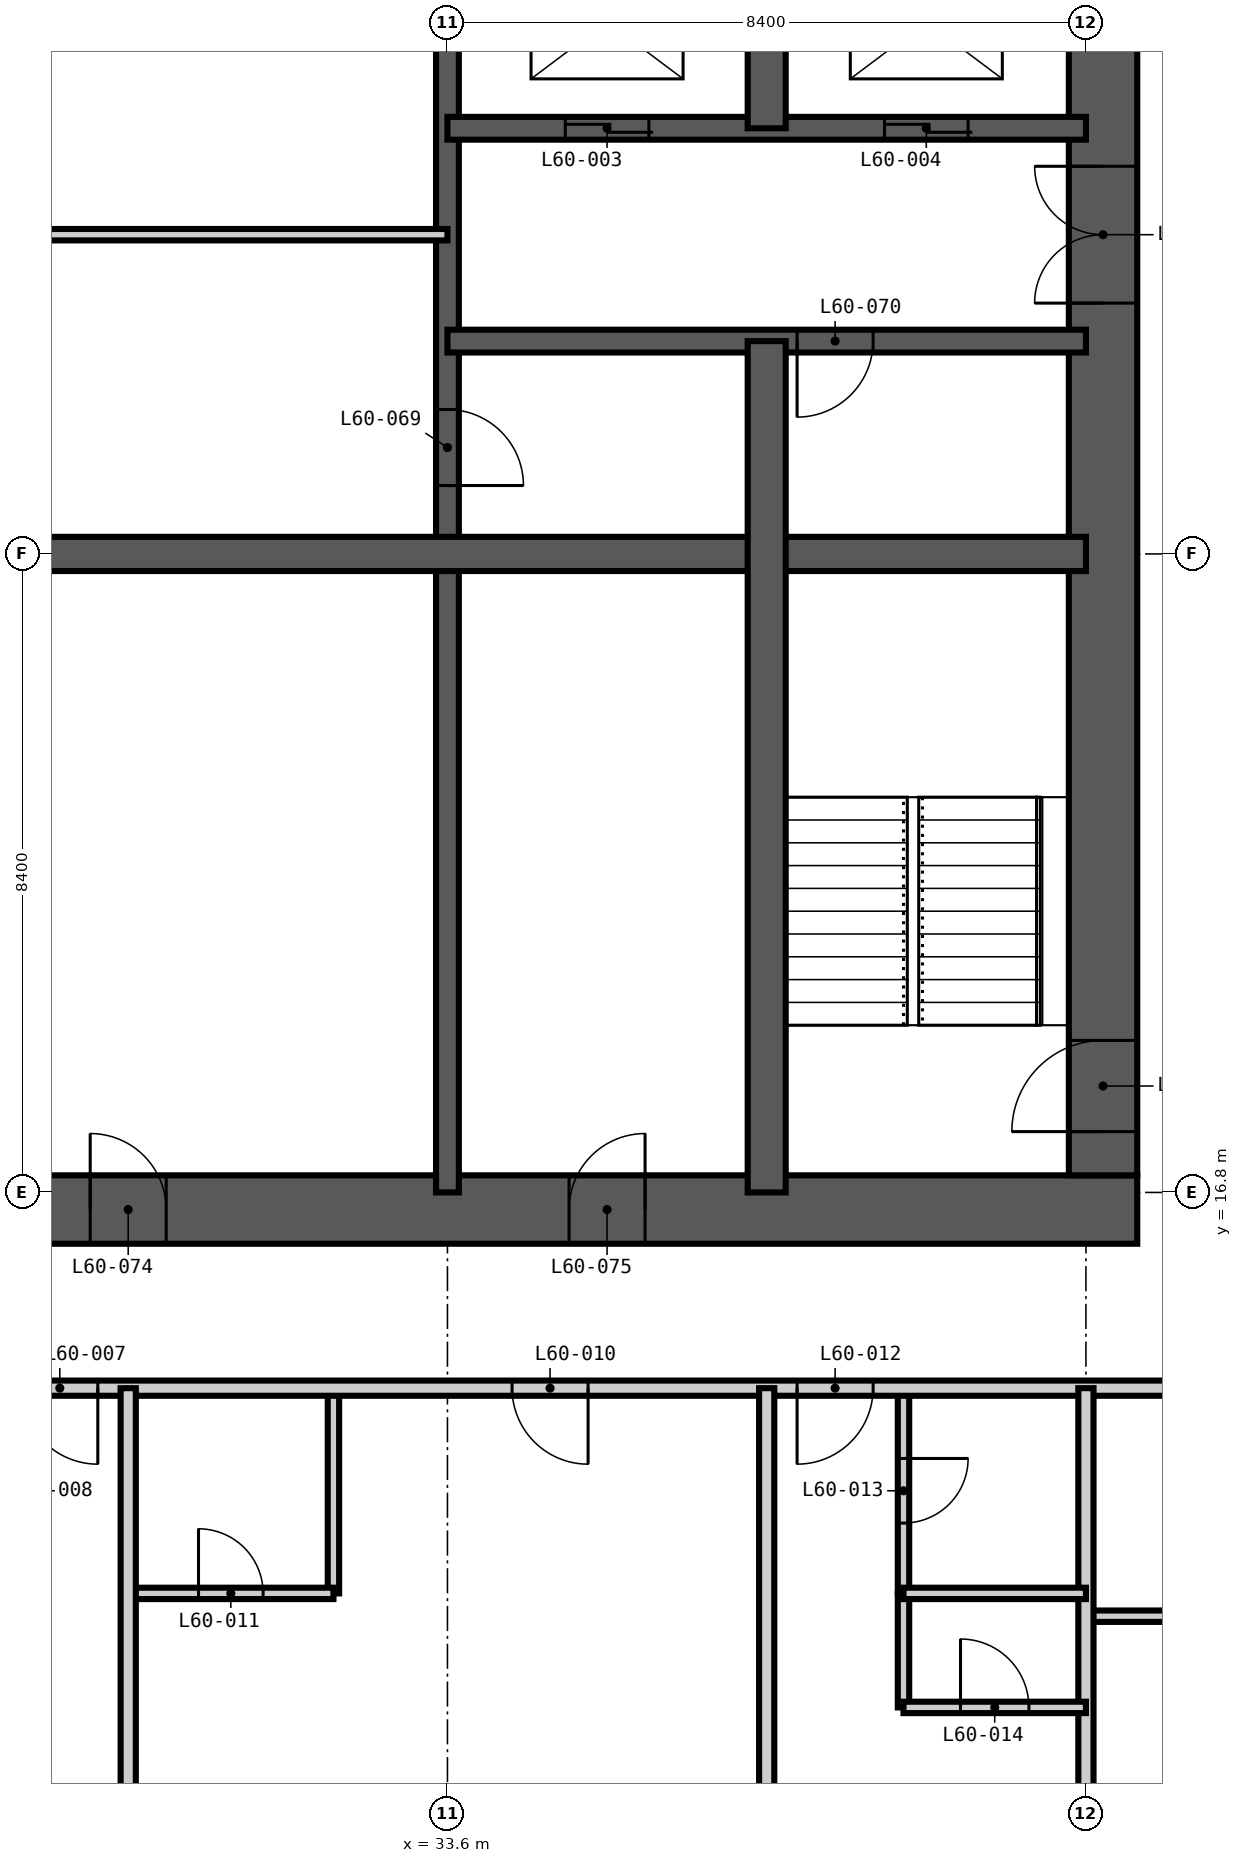
"""IFC4 building model, lengths in metres.
Left out: names, types, materials, properties, quantities, classifications, styles, units other than length and angle.
Written with IfcOpenShell. Run it as: python <this file> out.ifc"""

import sys

from ifc_helpers import new_model, si_unit, direction, frame, frame_2d, origin, place, context, subcontext, project, spatial, rectangle, extrude, element, fill, save


model = new_model("IFC4")
c1 = context("Model", 3, precision=1e-05, world=origin(), true_north=direction((0.0, 1.0)))
c2 = subcontext(c1, "Body", "Model", "MODEL_VIEW")
j1 = project(units=[si_unit("LENGTHUNIT", "METRE"), si_unit("PLANEANGLEUNIT", "RADIAN")], contexts=[c1])
p1 = place(None, origin())
s1 = spatial("IfcSite", under=j1, at=p1, CompositionType="ELEMENT")
p2 = place(p1, origin())
s2 = spatial("IfcBuilding", under=s1, at=p2, CompositionType="ELEMENT")
p3 = place(p2, frame((0.0, 0.0, 233.4)))
s3 = spatial("IfcBuildingStorey", under=s2, at=p3, CompositionType="ELEMENT", Elevation=233.4)
p4 = place(p3, frame((24.525, 16.575, -0.35), z_axis=(0.0, 0.0, 1.0), x_axis=(1.0, 0.0, 0.0)))
e1 = element("IfcWall", 1, at=p4, inside=s3, PredefinedType="SHEAR", context=c2, shape_type="SweptSolid", body=[
    extrude(rectangle(XDim=18.15, YDim=0.9, at=frame_2d((9.075, 0.0))), origin(), (0.0, 0.0, 1.0), 3.9),
])
p5 = place(p4, frame((4.375, 0.0, 0.35)))
e2 = element("IfcOpeningElement", 2, at=p5, cuts=e1, PredefinedType="OPENING", context=c2, shape_type="SweptSolid", body=[
    extrude(rectangle(XDim=1.0, YDim=2.1, at=frame_2d((0.5, 1.05))), frame((0.0, 0.46, 0.0), z_axis=(0.0, -1.0, 0.0), x_axis=(1.0, 0.0, 0.0)), (0.0, 0.0, 1.0), 0.92),
])
p6 = place(p4, frame((10.675, 0.0, 0.35)))
e3 = element("IfcOpeningElement", 3, at=p6, cuts=e1, PredefinedType="OPENING", context=c2, shape_type="SweptSolid", body=[
    extrude(rectangle(XDim=1.0, YDim=2.1, at=frame_2d((0.5, 1.05))), frame((0.0, 0.46, 0.0), z_axis=(0.0, -1.0, 0.0), x_axis=(1.0, 0.0, 0.0)), (0.0, 0.0, 1.0), 0.92),
])
p7 = place(p3, frame((42.225, 17.025, -0.35), z_axis=(0.0, 0.0, 1.0), x_axis=(0.0, 1.0, 0.0)))
e4 = element("IfcWall", 4, at=p7, inside=s3, PredefinedType="SHEAR", context=c2, shape_type="SweptSolid", body=[
    extrude(rectangle(XDim=24.75, YDim=0.9, at=frame_2d((12.375, 0.0))), origin(), (0.0, 0.0, 1.0), 3.9),
])
p8 = place(p7, frame((0.575, 0.0, 0.35)))
e5 = element("IfcOpeningElement", 5, at=p8, cuts=e4, PredefinedType="OPENING", context=c2, shape_type="SweptSolid", body=[
    extrude(rectangle(XDim=1.2, YDim=2.2, at=frame_2d((0.6, 1.1))), frame((0.0, 0.46, 0.0), z_axis=(0.0, -1.0, 0.0), x_axis=(1.0, 0.0, 0.0)), (0.0, 0.0, 1.0), 0.92),
])
p9 = place(p7, frame((11.475, 0.0, 0.35)))
e6 = element("IfcOpeningElement", 6, at=p9, cuts=e4, PredefinedType="OPENING", context=c2, shape_type="SweptSolid", body=[
    extrude(rectangle(XDim=1.8, YDim=2.2, at=frame_2d((0.9, 1.1))), frame((0.0, 0.46, 0.0), z_axis=(0.0, -1.0, 0.0), x_axis=(1.0, 0.0, 0.0)), (0.0, 0.0, 1.0), 0.92),
])
p10 = place(p7, frame((20.275, 0.0, 0.35)))
e7 = element("IfcOpeningElement", 7, at=p10, cuts=e4, PredefinedType="OPENING", context=c2, shape_type="SweptSolid", body=[
    extrude(rectangle(XDim=1.0, YDim=2.1, at=frame_2d((0.5, 1.05))), frame((0.0, 0.46, 0.0), z_axis=(0.0, -1.0, 0.0), x_axis=(1.0, 0.0, 0.0)), (0.0, 0.0, 1.0), 0.92),
])
p11 = place(p3, frame((33.6, 16.8, -0.35), z_axis=(0.0, 0.0, 1.0), x_axis=(0.0, 1.0, 0.0)))
e8 = element("IfcWall", 8, at=p11, inside=s3, PredefinedType="SHEAR", context=c2, shape_type="SweptSolid", body=[
    extrude(rectangle(XDim=25.2, YDim=0.3, at=frame_2d((12.6, 0.0))), origin(), (0.0, 0.0, 1.0), 3.9),
])
p12 = place(p11, frame((22.5, 0.0, 0.35)))
e9 = element("IfcOpeningElement", 9, at=p12, cuts=e8, PredefinedType="OPENING", context=c2, shape_type="SweptSolid", body=[
    extrude(rectangle(XDim=1.2, YDim=2.2, at=frame_2d((0.6, 1.1))), frame((0.0, 0.16, 0.0), z_axis=(0.0, -1.0, 0.0), x_axis=(1.0, 0.0, 0.0)), (0.0, 0.0, 1.0), 0.32),
])
p13 = place(p11, frame((18.3, 0.0, 0.35)))
e10 = element("IfcOpeningElement", 10, at=p13, cuts=e8, PredefinedType="OPENING", context=c2, shape_type="SweptSolid", body=[
    extrude(rectangle(XDim=1.2, YDim=2.2, at=frame_2d((0.6, 1.1))), frame((0.0, 0.16, 0.0), z_axis=(0.0, -1.0, 0.0), x_axis=(1.0, 0.0, 0.0)), (0.0, 0.0, 1.0), 0.32),
])
p14 = place(p11, frame((9.3, 0.0, 0.35)))
e11 = element("IfcOpeningElement", 11, at=p14, cuts=e8, PredefinedType="OPENING", context=c2, shape_type="SweptSolid", body=[
    extrude(rectangle(XDim=1.0, YDim=2.1, at=frame_2d((0.5, 1.05))), frame((0.0, 0.16, 0.0), z_axis=(0.0, -1.0, 0.0), x_axis=(1.0, 0.0, 0.0)), (0.0, 0.0, 1.0), 0.32),
])
p15 = place(p3, frame((33.6, 28.0, -0.35), z_axis=(0.0, 0.0, 1.0), x_axis=(1.0, 0.0, 0.0)))
e12 = element("IfcWall", 12, at=p15, inside=s3, PredefinedType="SHEAR", context=c2, shape_type="SweptSolid", body=[
    extrude(rectangle(XDim=8.4, YDim=0.3, at=frame_2d((4.2, 0.0))), origin(), (0.0, 0.0, 1.0), 3.9),
])
p16 = place(p15, frame((4.6, 0.0, 0.35)))
e13 = element("IfcOpeningElement", 13, at=p16, cuts=e12, PredefinedType="OPENING", context=c2, shape_type="SweptSolid", body=[
    extrude(rectangle(XDim=1.0, YDim=2.1, at=frame_2d((0.5, 1.05))), frame((0.0, 0.16, 0.0), z_axis=(0.0, -1.0, 0.0), x_axis=(1.0, 0.0, 0.0)), (0.0, 0.0, 1.0), 0.32),
])
p17 = place(p3, frame((33.6, 30.8, -0.35), z_axis=(0.0, 0.0, 1.0), x_axis=(1.0, 0.0, 0.0)))
e14 = element("IfcWall", 14, at=p17, inside=s3, PredefinedType="SHEAR", context=c2, shape_type="SweptSolid", body=[
    extrude(rectangle(XDim=8.4, YDim=0.3, at=frame_2d((4.2, 0.0))), origin(), (0.0, 0.0, 1.0), 3.9),
])
p18 = place(p17, frame((1.55, 0.0, 0.35)))
e15 = element("IfcOpeningElement", 15, at=p18, cuts=e14, PredefinedType="OPENING", context=c2, shape_type="SweptSolid", body=[
    extrude(rectangle(XDim=1.1, YDim=2.2, at=frame_2d((0.55, 1.1))), frame((0.0, 0.16, 0.0), z_axis=(0.0, -1.0, 0.0), x_axis=(1.0, 0.0, 0.0)), (0.0, 0.0, 1.0), 0.32),
])
p19 = place(p17, frame((5.75, 0.0, 0.35)))
e16 = element("IfcOpeningElement", 16, at=p19, cuts=e14, PredefinedType="OPENING", context=c2, shape_type="SweptSolid", body=[
    extrude(rectangle(XDim=1.1, YDim=2.2, at=frame_2d((0.55, 1.1))), frame((0.0, 0.16, 0.0), z_axis=(0.0, -1.0, 0.0), x_axis=(1.0, 0.0, 0.0)), (0.0, 0.0, 1.0), 0.32),
])
p20 = place(p3, frame((25.2, 25.2, -0.35), z_axis=(0.0, 0.0, 1.0), x_axis=(1.0, 0.0, 0.0)))
e17 = element("IfcWall", 17, at=p20, inside=s3, PredefinedType="SHEAR", context=c2, shape_type="SweptSolid", body=[
    extrude(rectangle(XDim=16.8, YDim=0.45, at=frame_2d((8.4, 0.0))), origin(), (0.0, 0.0, 1.0), 3.9),
])
p21 = place(p3, frame((37.8, 16.8, -0.35), z_axis=(0.0, 0.0, 1.0), x_axis=(0.0, 1.0, 0.0)))
e18 = element("IfcWall", 18, at=p21, inside=s3, PredefinedType="SHEAR", context=c2, shape_type="SweptSolid", body=[
    extrude(rectangle(XDim=11.2, YDim=0.5, at=frame_2d((5.6, 0.0))), origin(), (0.0, 0.0, 1.0), 3.9),
])
p22 = place(p3, frame((37.8, 30.8, -0.35), z_axis=(0.0, 0.0, 1.0), x_axis=(0.0, 1.0, 0.0)))
e19 = element("IfcWall", 19, at=p22, inside=s3, PredefinedType="SHEAR", context=c2, shape_type="SweptSolid", body=[
    extrude(rectangle(XDim=2.8, YDim=0.5, at=frame_2d((1.4, 0.0))), origin(), (0.0, 0.0, 1.0), 3.9),
])
p23 = place(p3, frame((32.1, 11.525, 0.0), z_axis=(0.0, 0.0, 1.0), x_axis=(0.0, 1.0, 0.0)))
e20 = element("IfcWall", 20, at=p23, inside=s3, PredefinedType="PARTITIONING", context=c2, shape_type="SweptSolid", body=[
    extrude(rectangle(XDim=2.7, YDim=0.15, at=frame_2d((1.35, 0.0))), origin(), (0.0, 0.0, 1.0), 3.55),
])
p24 = place(p3, frame((39.6, 11.525, 0.0), z_axis=(0.0, 0.0, 1.0), x_axis=(0.0, 1.0, 0.0)))
e21 = element("IfcWall", 21, at=p24, inside=s3, PredefinedType="PARTITIONING", context=c2, shape_type="SweptSolid", body=[
    extrude(rectangle(XDim=2.7, YDim=0.15, at=frame_2d((1.35, 0.0))), origin(), (0.0, 0.0, 1.0), 3.55),
])
p25 = place(p24, frame((0.925, 0.0, 0.0)))
e22 = element("IfcOpeningElement", 22, at=p25, cuts=e21, PredefinedType="OPENING", context=c2, shape_type="SweptSolid", body=[
    extrude(rectangle(XDim=0.85, YDim=2.1, at=frame_2d((0.425, 1.05))), frame((0.0, 0.085, 0.0), z_axis=(0.0, -1.0, 0.0), x_axis=(1.0, 0.0, 0.0)), (0.0, 0.0, 1.0), 0.17),
])
p26 = place(p3, frame((42.0, 11.225, 0.0), z_axis=(0.0, 0.0, 1.0), x_axis=(1.0, 0.0, 0.0)))
e23 = element("IfcWall", 23, at=p26, inside=s3, PredefinedType="PARTITIONING", context=c2, shape_type="SweptSolid", body=[
    extrude(rectangle(XDim=2.875, YDim=0.15, at=frame_2d((1.438, 0.0))), origin(), (0.0, 0.0, 1.0), 3.55),
])
p27 = place(p3, frame((29.4, 11.525, 0.0), z_axis=(0.0, 0.0, 1.0), x_axis=(1.0, 0.0, 0.0)))
e24 = element("IfcWall", 24, at=p27, inside=s3, PredefinedType="PARTITIONING", context=c2, shape_type="SweptSolid", body=[
    extrude(rectangle(XDim=2.7, YDim=0.15, at=frame_2d((1.35, 0.0))), origin(), (0.0, 0.0, 1.0), 3.55),
])
p28 = place(p27, frame((0.925, 0.0, 0.0)))
e25 = element("IfcOpeningElement", 25, at=p28, cuts=e24, PredefinedType="OPENING", context=c2, shape_type="SweptSolid", body=[
    extrude(rectangle(XDim=0.85, YDim=2.1, at=frame_2d((0.425, 1.05))), frame((0.0, 0.085, 0.0), z_axis=(0.0, -1.0, 0.0), x_axis=(1.0, 0.0, 0.0)), (0.0, 0.0, 1.0), 0.17),
])
p29 = place(p3, frame((44.875, 14.225, 0.0), z_axis=(0.0, 0.0, 1.0), x_axis=(-1.0, 0.0, 0.0)))
e26 = element("IfcWall", 26, at=p29, inside=s3, PredefinedType="PARTITIONING", context=c2, shape_type="SweptSolid", body=[
    extrude(rectangle(XDim=22.25, YDim=0.2, at=frame_2d((11.125, 0.0))), origin(), (0.0, 0.0, 1.0), 3.55),
])
p30 = place(p29, frame((15.875, 0.0, 0.0)))
e27 = element("IfcOpeningElement", 27, at=p30, cuts=e26, PredefinedType="OPENING", context=c2, shape_type="SweptSolid", body=[
    extrude(rectangle(XDim=1.0, YDim=2.2, at=frame_2d((0.5, 1.1))), frame((0.0, 0.11, 0.0), z_axis=(0.0, -1.0, 0.0), x_axis=(1.0, 0.0, 0.0)), (0.0, 0.0, 1.0), 0.22),
])
p31 = place(p29, frame((9.425, 0.0, 0.0)))
e28 = element("IfcOpeningElement", 28, at=p31, cuts=e26, PredefinedType="OPENING", context=c2, shape_type="SweptSolid", body=[
    extrude(rectangle(XDim=1.0, YDim=2.2, at=frame_2d((0.5, 1.1))), frame((0.0, 0.11, 0.0), z_axis=(0.0, -1.0, 0.0), x_axis=(1.0, 0.0, 0.0)), (0.0, 0.0, 1.0), 0.22),
])
p32 = place(p29, frame((5.675, 0.0, 0.0)))
e29 = element("IfcOpeningElement", 29, at=p32, cuts=e26, PredefinedType="OPENING", context=c2, shape_type="SweptSolid", body=[
    extrude(rectangle(XDim=1.0, YDim=2.2, at=frame_2d((0.5, 1.1))), frame((0.0, 0.11, 0.0), z_axis=(0.0, -1.0, 0.0), x_axis=(1.0, 0.0, 0.0)), (0.0, 0.0, 1.0), 0.22),
])
for number, where, z_axis, x_axis in (
    (30, (29.4, 4.182, 0.0), (0.0, 0.0, 1.0), (0.0, 1.0, 0.0)),
    (31, (37.8, 4.182, 0.0), (0.0, 0.0, 1.0), (0.0, 1.0, 0.0)),
    (32, (42.0, 4.182, 0.0), (0.0, 0.0, 1.0), (0.0, 1.0, 0.0)),
):
    element("IfcWall", number, at=place(p3, frame(where, z_axis=z_axis, x_axis=x_axis)), inside=s3, PredefinedType="PARTITIONING", context=c2, shape_type="SweptSolid", body=[
        extrude(rectangle(XDim=10.043, YDim=0.2, at=frame_2d((5.021, 0.0))), origin(), (0.0, 0.0, 1.0), 3.55),
    ])
p33 = place(p3, frame((39.6, 10.025, 0.0), z_axis=(0.0, 0.0, 1.0), x_axis=(0.0, 1.0, 0.0)))
e33 = element("IfcWall", 33, at=p33, inside=s3, PredefinedType="PARTITIONING", context=c2, shape_type="SweptSolid", body=[
    extrude(rectangle(XDim=1.5, YDim=0.15, at=frame_2d((0.75, 0.0))), origin(), (0.0, 0.0, 1.0), 3.55),
])
p34 = place(p3, frame((39.6, 10.025, 0.0), z_axis=(0.0, 0.0, 1.0), x_axis=(1.0, 0.0, 0.0)))
e34 = element("IfcWall", 34, at=p34, inside=s3, PredefinedType="PARTITIONING", context=c2, shape_type="SweptSolid", body=[
    extrude(rectangle(XDim=2.4, YDim=0.15, at=frame_2d((1.2, 0.0))), origin(), (0.0, 0.0, 1.0), 3.55),
])
p35 = place(p34, frame((0.75, 0.0, 0.0)))
e35 = element("IfcOpeningElement", 35, at=p35, cuts=e34, PredefinedType="OPENING", context=c2, shape_type="SweptSolid", body=[
    extrude(rectangle(XDim=0.9, YDim=2.1, at=frame_2d((0.45, 1.05))), frame((0.0, 0.085, 0.0), z_axis=(0.0, -1.0, 0.0), x_axis=(1.0, 0.0, 0.0)), (0.0, 0.0, 1.0), 0.17),
])
p36 = place(p3, frame((39.6, 11.525, 0.0), z_axis=(0.0, 0.0, 1.0), x_axis=(1.0, 0.0, 0.0)))
e36 = element("IfcWall", 36, at=p36, inside=s3, PredefinedType="PARTITIONING", context=c2, shape_type="SweptSolid", body=[
    extrude(rectangle(XDim=2.4, YDim=0.15, at=frame_2d((1.2, 0.0))), origin(), (0.0, 0.0, 1.0), 3.55),
])
p37 = place(p3, frame((27.0, 29.4, 0.0), z_axis=(0.0, 0.0, 1.0), x_axis=(1.0, 0.0, 0.0)))
e37 = element("IfcWall", 37, at=p37, inside=s3, PredefinedType="PARTITIONING", context=c2, shape_type="SweptSolid", body=[
    extrude(rectangle(XDim=6.6, YDim=0.15, at=frame_2d((3.3, 0.0))), origin(), (0.0, 0.0, 1.0), 3.55),
])
p38 = place(p8, origin())
e38 = element("IfcDoor", 38, at=p38, inside=s3, OperationType="SINGLE_SWING_LEFT", PredefinedType="DOOR", context=c2, shape_type="SweptSolid", body=[
    extrude(rectangle(XDim=1.2, YDim=2.2, at=frame_2d((0.6, 1.1))), frame((0.0, 0.025, 0.0), z_axis=(0.0, -1.0, 0.0), x_axis=(1.0, 0.0, 0.0)), (0.0, 0.0, 1.0), 0.05),
])
fill(e5, e38)
p39 = place(p18, origin())
e39 = element("IfcDoor", 39, at=p39, inside=s3, OperationType="DOUBLE_DOOR_SLIDING", PredefinedType="DOOR", context=c2, shape_type="SweptSolid", body=[
    extrude(rectangle(XDim=1.1, YDim=2.2, at=frame_2d((0.55, 1.1))), frame((0.0, 0.025, 0.0), z_axis=(0.0, -1.0, 0.0), x_axis=(1.0, 0.0, 0.0)), (0.0, 0.0, 1.0), 0.05),
])
fill(e15, e39)
p40 = place(p19, origin())
e40 = element("IfcDoor", 40, at=p40, inside=s3, OperationType="DOUBLE_DOOR_SLIDING", PredefinedType="DOOR", context=c2, shape_type="SweptSolid", body=[
    extrude(rectangle(XDim=1.1, YDim=2.2, at=frame_2d((0.55, 1.1))), frame((0.0, 0.025, 0.0), z_axis=(0.0, -1.0, 0.0), x_axis=(1.0, 0.0, 0.0)), (0.0, 0.0, 1.0), 0.05),
])
fill(e16, e40)
p41 = place(p30, origin())
e41 = element("IfcDoor", 41, at=p41, inside=s3, OperationType="SINGLE_SWING_LEFT", PredefinedType="DOOR", context=c2, shape_type="SweptSolid", body=[
    extrude(rectangle(XDim=1.0, YDim=2.2, at=frame_2d((0.5, 1.1))), frame((0.0, 0.025, 0.0), z_axis=(0.0, -1.0, 0.0), x_axis=(1.0, 0.0, 0.0)), (0.0, 0.0, 1.0), 0.05),
])
fill(e27, e41)
p42 = place(p31, origin())
e42 = element("IfcDoor", 42, at=p42, inside=s3, OperationType="SINGLE_SWING_LEFT", PredefinedType="DOOR", context=c2, shape_type="SweptSolid", body=[
    extrude(rectangle(XDim=1.0, YDim=2.2, at=frame_2d((0.5, 1.1))), frame((0.0, 0.025, 0.0), z_axis=(0.0, -1.0, 0.0), x_axis=(1.0, 0.0, 0.0)), (0.0, 0.0, 1.0), 0.05),
])
fill(e28, e42)
p43 = place(p28, origin())
e43 = element("IfcDoor", 43, at=p43, inside=s3, OperationType="SINGLE_SWING_LEFT", PredefinedType="DOOR", context=c2, shape_type="SweptSolid", body=[
    extrude(rectangle(XDim=0.85, YDim=2.1, at=frame_2d((0.425, 1.05))), frame((0.0, 0.025, 0.0), z_axis=(0.0, -1.0, 0.0), x_axis=(1.0, 0.0, 0.0)), (0.0, 0.0, 1.0), 0.05),
])
fill(e25, e43)
p44 = place(p32, origin())
e44 = element("IfcDoor", 44, at=p44, inside=s3, OperationType="SINGLE_SWING_RIGHT", PredefinedType="DOOR", context=c2, shape_type="SweptSolid", body=[
    extrude(rectangle(XDim=1.0, YDim=2.2, at=frame_2d((0.5, 1.1))), frame((0.0, 0.025, 0.0), z_axis=(0.0, -1.0, 0.0), x_axis=(1.0, 0.0, 0.0)), (0.0, 0.0, 1.0), 0.05),
])
fill(e29, e44)
p45 = place(p25, frame((0.85, 0.0, 0.0), z_axis=(0.0, 0.0, 1.0), x_axis=(-1.0, 0.0, 0.0)))
e45 = element("IfcDoor", 45, at=p45, inside=s3, OperationType="SINGLE_SWING_LEFT", PredefinedType="DOOR", context=c2, shape_type="SweptSolid", body=[
    extrude(rectangle(XDim=0.85, YDim=2.1, at=frame_2d((0.425, 1.05))), frame((0.0, 0.025, 0.0), z_axis=(0.0, -1.0, 0.0), x_axis=(1.0, 0.0, 0.0)), (0.0, 0.0, 1.0), 0.05),
])
fill(e22, e45)
p46 = place(p35, origin())
e46 = element("IfcDoor", 46, at=p46, inside=s3, OperationType="SINGLE_SWING_LEFT", PredefinedType="DOOR", context=c2, shape_type="SweptSolid", body=[
    extrude(rectangle(XDim=0.9, YDim=2.1, at=frame_2d((0.45, 1.05))), frame((0.0, 0.025, 0.0), z_axis=(0.0, -1.0, 0.0), x_axis=(1.0, 0.0, 0.0)), (0.0, 0.0, 1.0), 0.05),
])
fill(e35, e46)
p47 = place(p14, frame((1.0, 0.0, 0.0), z_axis=(0.0, 0.0, 1.0), x_axis=(-1.0, 0.0, 0.0)))
e47 = element("IfcDoor", 47, at=p47, inside=s3, OperationType="SINGLE_SWING_RIGHT", PredefinedType="DOOR", context=c2, shape_type="SweptSolid", body=[
    extrude(rectangle(XDim=1.0, YDim=2.1, at=frame_2d((0.5, 1.05))), frame((0.0, 0.025, 0.0), z_axis=(0.0, -1.0, 0.0), x_axis=(1.0, 0.0, 0.0)), (0.0, 0.0, 1.0), 0.05),
])
fill(e11, e47)
p48 = place(p16, frame((1.0, 0.0, 0.0), z_axis=(0.0, 0.0, 1.0), x_axis=(-1.0, 0.0, 0.0)))
e48 = element("IfcDoor", 48, at=p48, inside=s3, OperationType="SINGLE_SWING_RIGHT", PredefinedType="DOOR", context=c2, shape_type="SweptSolid", body=[
    extrude(rectangle(XDim=1.0, YDim=2.1, at=frame_2d((0.5, 1.05))), frame((0.0, 0.025, 0.0), z_axis=(0.0, -1.0, 0.0), x_axis=(1.0, 0.0, 0.0)), (0.0, 0.0, 1.0), 0.05),
])
fill(e13, e48)
p49 = place(p9, origin())
e49 = element("IfcDoor", 49, at=p49, inside=s3, OperationType="DOUBLE_DOOR_DOUBLE_SWING", PredefinedType="DOOR", context=c2, shape_type="SweptSolid", body=[
    extrude(rectangle(XDim=1.8, YDim=2.2, at=frame_2d((0.9, 1.1))), frame((0.0, 0.025, 0.0), z_axis=(0.0, -1.0, 0.0), x_axis=(1.0, 0.0, 0.0)), (0.0, 0.0, 1.0), 0.05),
])
fill(e6, e49)
p50 = place(p5, origin())
e50 = element("IfcDoor", 50, at=p50, inside=s3, OperationType="SINGLE_SWING_LEFT", PredefinedType="DOOR", context=c2, shape_type="SweptSolid", body=[
    extrude(rectangle(XDim=1.0, YDim=2.1, at=frame_2d((0.5, 1.05))), frame((0.0, 0.025, 0.0), z_axis=(0.0, -1.0, 0.0), x_axis=(1.0, 0.0, 0.0)), (0.0, 0.0, 1.0), 0.05),
])
fill(e2, e50)
p51 = place(p6, origin())
e51 = element("IfcDoor", 51, at=p51, inside=s3, OperationType="SINGLE_SWING_RIGHT", PredefinedType="DOOR", context=c2, shape_type="SweptSolid", body=[
    extrude(rectangle(XDim=1.0, YDim=2.1, at=frame_2d((0.5, 1.05))), frame((0.0, 0.025, 0.0), z_axis=(0.0, -1.0, 0.0), x_axis=(1.0, 0.0, 0.0)), (0.0, 0.0, 1.0), 0.05),
])
fill(e3, e51)
save(model, sys.argv[1])
